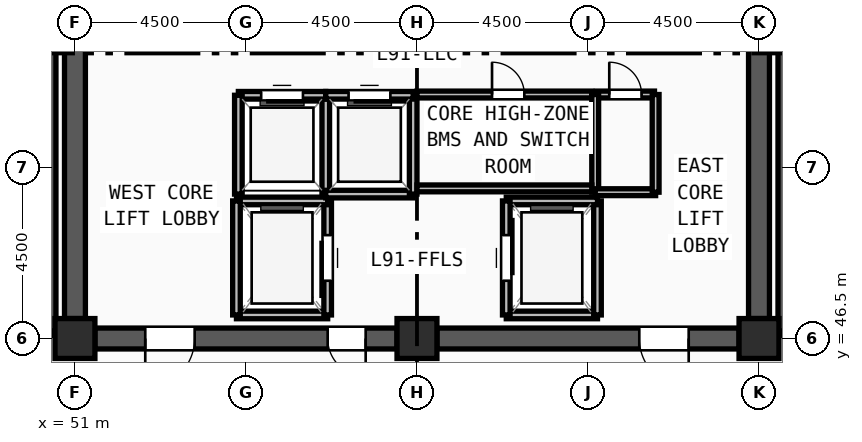
"""IFC4 building model, lengths in metres.
Left out: names, types, materials, properties, quantities, classifications, styles, units other than length and angle.
Written with IfcOpenShell. Run it as: python <this file> out.ifc"""

import sys

from ifc_helpers import new_model, si_unit, direction, frame, frame_2d, origin, origin_2d, place, context, subcontext, project, spatial, rectangle, extrude, source, transform, mapped, element, fill, save


model = new_model("IFC4")
c1 = context("Model", 3, precision=1e-05, world=origin(), true_north=direction((0.0, 1.0)))
c2 = subcontext(c1, "Body", "Model", "MODEL_VIEW")
j1 = project(units=[si_unit("LENGTHUNIT", "METRE"), si_unit("PLANEANGLEUNIT", "RADIAN")], contexts=[c1])
p1 = place(None, origin())
s1 = spatial("IfcSite", under=j1, at=p1, CompositionType="ELEMENT")
p2 = place(p1, origin())
s2 = spatial("IfcBuilding", under=s1, at=p2, CompositionType="ELEMENT")
p3 = place(p2, frame((0.0, 0.0, 351.0)))
s3 = spatial("IfcBuildingStorey", under=s2, at=p3, CompositionType="ELEMENT", Elevation=351.0)
m1 = source(origin(), c2, "Body", "SweptSolid", [
    extrude(rectangle(XDim=1.05, YDim=1.05, at=origin_2d()), origin(), (0.0, 0.0, 1.0), 4.8),
])
for number, where, z_axis, x_axis in (
    (1, (51.0, 46.5, 0.0), (0.0, 0.0, 1.0), (1.0, 0.0, 0.0)),
    (2, (60.0, 46.5, 0.0), (0.0, 0.0, 1.0), (1.0, 0.0, 0.0)),
    (3, (69.0, 46.5, 0.0), (0.0, 0.0, 1.0), (1.0, 0.0, 0.0)),
):
    element("IfcColumn", number, at=place(p3, frame(where, z_axis=z_axis, x_axis=x_axis)), inside=s3, PredefinedType="COLUMN", context=c2, shape_type="MappedRepresentation", body=[
        mapped(m1, transform((0.0, 0.0, 0.0), x_axis=(1.0, 0.0, 0.0), y_axis=(0.0, 1.0, 0.0), z_axis=(0.0, 0.0, 1.0), scale=1.0)),
    ])
p4 = place(p3, frame((69.0, 60.975, 0.0), z_axis=(0.0, 0.0, 1.0), x_axis=(0.0, -1.0, 0.0)))
e4 = element("IfcWall", 4, at=p4, inside=s3, PredefinedType="SHEAR", context=c2, shape_type="SweptSolid", body=[
    extrude(rectangle(XDim=13.95, YDim=0.55, at=frame_2d((6.975, 0.0))), origin(), (0.0, 0.0, 1.0), 4.52),
])
m2 = source(origin(), c2, "Body", "SweptSolid", [
    extrude(rectangle(XDim=1.2, YDim=2.2, at=frame_2d((0.6, 1.1))), frame((0.0, 0.285, 0.0), z_axis=(0.0, -1.0, 0.0), x_axis=(1.0, 0.0, 0.0)), (0.0, 0.0, 1.0), 0.57),
])
p5 = place(p4, frame((1.425, 0.0, 0.0)))
e5 = element("IfcOpeningElement", 5, at=p5, cuts=e4, PredefinedType="OPENING", context=c2, shape_type="MappedRepresentation", body=[
    mapped(m2, transform((0.0, 0.0, 0.0), x_axis=(1.0, 0.0, 0.0), y_axis=(0.0, 1.0, 0.0), z_axis=(0.0, 0.0, 1.0), scale=1.0)),
])
p6 = place(p3, frame((68.475, 46.5, 0.0), z_axis=(0.0, 0.0, 1.0), x_axis=(-1.0, 0.0, 0.0)))
e6 = element("IfcWall", 6, at=p6, inside=s3, PredefinedType="SHEAR", context=c2, shape_type="SweptSolid", body=[
    extrude(rectangle(XDim=7.95, YDim=0.55, at=frame_2d((3.975, 0.0))), origin(), (0.0, 0.0, 1.0), 4.52),
])
m3 = source(origin(), c2, "Body", "SweptSolid", [
    extrude(rectangle(XDim=1.3, YDim=2.2, at=frame_2d((0.65, 1.1))), frame((0.0, 0.285, 0.0), z_axis=(0.0, -1.0, 0.0), x_axis=(1.0, 0.0, 0.0)), (0.0, 0.0, 1.0), 0.57),
])
p7 = place(p6, frame((1.325, 0.0, 0.0)))
e7 = element("IfcOpeningElement", 7, at=p7, cuts=e6, PredefinedType="OPENING", context=c2, shape_type="MappedRepresentation", body=[
    mapped(m3, transform((0.0, 0.0, 0.0), x_axis=(1.0, 0.0, 0.0), y_axis=(0.0, 1.0, 0.0), z_axis=(0.0, 0.0, 1.0), scale=1.0)),
])
p8 = place(p3, frame((59.475, 46.5, 0.0), z_axis=(0.0, 0.0, 1.0), x_axis=(-1.0, 0.0, 0.0)))
e8 = element("IfcWall", 8, at=p8, inside=s3, PredefinedType="SHEAR", context=c2, shape_type="SweptSolid", body=[
    extrude(rectangle(XDim=7.95, YDim=0.55, at=frame_2d((3.975, 0.0))), origin(), (0.0, 0.0, 1.0), 4.52),
])
p9 = place(p8, frame((5.325, 0.0, 0.0)))
e9 = element("IfcOpeningElement", 9, at=p9, cuts=e8, PredefinedType="OPENING", context=c2, shape_type="MappedRepresentation", body=[
    mapped(m3, transform((0.0, 0.0, 0.0), x_axis=(1.0, 0.0, 0.0), y_axis=(0.0, 1.0, 0.0), z_axis=(0.0, 0.0, 1.0), scale=1.0)),
])
m4 = source(origin(), c2, "Body", "SweptSolid", [
    extrude(rectangle(XDim=1.0, YDim=2.2, at=frame_2d((0.5, 1.1))), frame((0.0, 0.285, 0.0), z_axis=(0.0, -1.0, 0.0), x_axis=(1.0, 0.0, 0.0)), (0.0, 0.0, 1.0), 0.57),
])
p10 = place(p8, frame((0.825, 0.0, 0.0)))
e10 = element("IfcOpeningElement", 10, at=p10, cuts=e8, PredefinedType="OPENING", context=c2, shape_type="MappedRepresentation", body=[
    mapped(m4, transform((0.0, 0.0, 0.0), x_axis=(1.0, 0.0, 0.0), y_axis=(0.0, 1.0, 0.0), z_axis=(0.0, 0.0, 1.0), scale=1.0)),
])
p11 = place(p3, frame((51.0, 47.025, 0.0), z_axis=(0.0, 0.0, 1.0), x_axis=(0.0, 1.0, 0.0)))
e11 = element("IfcWall", 11, at=p11, inside=s3, PredefinedType="SHEAR", context=c2, shape_type="SweptSolid", body=[
    extrude(rectangle(XDim=13.95, YDim=0.55, at=frame_2d((6.975, 0.0))), origin(), (0.0, 0.0, 1.0), 4.52),
])
for number, where, z_axis, x_axis in (
    (12, (50.38, 46.7, 0.0), (0.0, 0.0, 1.0), (0.0, 1.0, 0.0)),
    (13, (69.62, 54.52, 0.0), (0.0, 0.0, 1.0), (0.0, -1.0, 0.0)),
):
    element("IfcWall", number, at=place(p3, frame(where, z_axis=z_axis, x_axis=x_axis)), inside=s3, PredefinedType="SOLIDWALL", context=c2, shape_type="SweptSolid", body=[
        extrude(rectangle(XDim=7.82, YDim=0.24, at=frame_2d((3.91, 0.0))), origin(), (0.0, 0.0, 1.0), 4.52),
    ])
p12 = place(p3, frame((55.25, 47.12, 0.0), z_axis=(0.0, 0.0, 1.0), x_axis=(1.0, 0.0, 0.0)))
e14 = element("IfcWall", 14, at=p12, inside=s3, PredefinedType="SOLIDWALL", context=c2, shape_type="SweptSolid", body=[
    extrude(rectangle(XDim=2.4, YDim=0.2, at=frame_2d((1.2, 0.0))), origin(), (0.0, 0.0, 1.0), 4.52),
])
p13 = place(p3, frame((57.65, 47.12, 0.0), z_axis=(0.0, 0.0, 1.0), x_axis=(0.0, 1.0, 0.0)))
e15 = element("IfcWall", 15, at=p13, inside=s3, PredefinedType="SOLIDWALL", context=c2, shape_type="SweptSolid", body=[
    extrude(rectangle(XDim=3.0, YDim=0.2, at=frame_2d((1.5, 0.0))), origin(), (0.0, 0.0, 1.0), 4.52),
])
m5 = source(origin(), c2, "Body", "SweptSolid", [
    extrude(rectangle(XDim=1.2, YDim=2.3, at=frame_2d((0.6, 1.15))), frame((0.0, 0.11, 0.0), z_axis=(0.0, -1.0, 0.0), x_axis=(1.0, 0.0, 0.0)), (0.0, 0.0, 1.0), 0.22),
])
p14 = place(p13, frame((0.9, 0.0, 0.0)))
e16 = element("IfcOpeningElement", 16, at=p14, cuts=e15, PredefinedType="OPENING", context=c2, shape_type="MappedRepresentation", body=[
    mapped(m5, transform((0.0, 0.0, 0.0), x_axis=(1.0, 0.0, 0.0), y_axis=(0.0, 1.0, 0.0), z_axis=(0.0, 0.0, 1.0), scale=1.0)),
])
p15 = place(p3, frame((57.65, 50.12, 0.0), z_axis=(0.0, 0.0, 1.0), x_axis=(-1.0, 0.0, 0.0)))
e17 = element("IfcWall", 17, at=p15, inside=s3, PredefinedType="SOLIDWALL", context=c2, shape_type="SweptSolid", body=[
    extrude(rectangle(XDim=2.4, YDim=0.2, at=frame_2d((1.2, 0.0))), origin(), (0.0, 0.0, 1.0), 4.52),
])
p16 = place(p3, frame((55.25, 50.12, 0.0), z_axis=(0.0, 0.0, 1.0), x_axis=(0.0, -1.0, 0.0)))
e18 = element("IfcWall", 18, at=p16, inside=s3, PredefinedType="SOLIDWALL", context=c2, shape_type="SweptSolid", body=[
    extrude(rectangle(XDim=3.0, YDim=0.2, at=frame_2d((1.5, 0.0))), origin(), (0.0, 0.0, 1.0), 4.52),
])
p17 = place(p3, frame((62.35, 47.12, 0.0), z_axis=(0.0, 0.0, 1.0), x_axis=(1.0, 0.0, 0.0)))
e19 = element("IfcWall", 19, at=p17, inside=s3, PredefinedType="SOLIDWALL", context=c2, shape_type="SweptSolid", body=[
    extrude(rectangle(XDim=2.4, YDim=0.2, at=frame_2d((1.2, 0.0))), origin(), (0.0, 0.0, 1.0), 4.52),
])
p18 = place(p3, frame((64.75, 47.12, 0.0), z_axis=(0.0, 0.0, 1.0), x_axis=(0.0, 1.0, 0.0)))
e20 = element("IfcWall", 20, at=p18, inside=s3, PredefinedType="SOLIDWALL", context=c2, shape_type="SweptSolid", body=[
    extrude(rectangle(XDim=3.0, YDim=0.2, at=frame_2d((1.5, 0.0))), origin(), (0.0, 0.0, 1.0), 4.52),
])
p19 = place(p3, frame((64.75, 50.12, 0.0), z_axis=(0.0, 0.0, 1.0), x_axis=(-1.0, 0.0, 0.0)))
e21 = element("IfcWall", 21, at=p19, inside=s3, PredefinedType="SOLIDWALL", context=c2, shape_type="SweptSolid", body=[
    extrude(rectangle(XDim=2.4, YDim=0.2, at=frame_2d((1.2, 0.0))), origin(), (0.0, 0.0, 1.0), 4.52),
])
p20 = place(p3, frame((62.35, 50.12, 0.0), z_axis=(0.0, 0.0, 1.0), x_axis=(0.0, -1.0, 0.0)))
e22 = element("IfcWall", 22, at=p20, inside=s3, PredefinedType="SOLIDWALL", context=c2, shape_type="SweptSolid", body=[
    extrude(rectangle(XDim=3.0, YDim=0.2, at=frame_2d((1.5, 0.0))), origin(), (0.0, 0.0, 1.0), 4.52),
])
p21 = place(p20, frame((0.9, 0.0, 0.0)))
e23 = element("IfcOpeningElement", 23, at=p21, cuts=e22, PredefinedType="OPENING", context=c2, shape_type="MappedRepresentation", body=[
    mapped(m5, transform((0.0, 0.0, 0.0), x_axis=(1.0, 0.0, 0.0), y_axis=(0.0, 1.0, 0.0), z_axis=(0.0, 0.0, 1.0), scale=1.0)),
])
p22 = place(p3, frame((57.6, 50.3, 0.0), z_axis=(0.0, 0.0, 1.0), x_axis=(0.0, 1.0, 0.0)))
e24 = element("IfcWall", 24, at=p22, inside=s3, PredefinedType="SOLIDWALL", context=c2, shape_type="SweptSolid", body=[
    extrude(rectangle(XDim=2.6, YDim=0.2, at=frame_2d((1.3, 0.0))), origin(), (0.0, 0.0, 1.0), 4.52),
])
p23 = place(p3, frame((57.6, 52.9, 0.0), z_axis=(0.0, 0.0, 1.0), x_axis=(-1.0, 0.0, 0.0)))
e25 = element("IfcWall", 25, at=p23, inside=s3, PredefinedType="SOLIDWALL", context=c2, shape_type="SweptSolid", body=[
    extrude(rectangle(XDim=2.3, YDim=0.2, at=frame_2d((1.15, 0.0))), origin(), (0.0, 0.0, 1.0), 4.52),
])
m6 = source(origin(), c2, "Body", "SweptSolid", [
    extrude(rectangle(XDim=1.1, YDim=2.2, at=frame_2d((0.55, 1.1))), frame((0.0, 0.11, 0.0), z_axis=(0.0, -1.0, 0.0), x_axis=(1.0, 0.0, 0.0)), (0.0, 0.0, 1.0), 0.22),
])
p24 = place(p23, frame((0.6, 0.0, 0.0)))
e26 = element("IfcOpeningElement", 26, at=p24, cuts=e25, PredefinedType="OPENING", context=c2, shape_type="MappedRepresentation", body=[
    mapped(m6, transform((0.0, 0.0, 0.0), x_axis=(1.0, 0.0, 0.0), y_axis=(0.0, 1.0, 0.0), z_axis=(0.0, 0.0, 1.0), scale=1.0)),
])
p25 = place(p3, frame((55.3, 52.9, 0.0), z_axis=(0.0, 0.0, 1.0), x_axis=(0.0, -1.0, 0.0)))
e27 = element("IfcWall", 27, at=p25, inside=s3, PredefinedType="SOLIDWALL", context=c2, shape_type="SweptSolid", body=[
    extrude(rectangle(XDim=2.6, YDim=0.2, at=frame_2d((1.3, 0.0))), origin(), (0.0, 0.0, 1.0), 4.52),
])
p26 = place(p3, frame((57.6, 50.3, 0.0), z_axis=(0.0, 0.0, 1.0), x_axis=(1.0, 0.0, 0.0)))
e28 = element("IfcWall", 28, at=p26, inside=s3, PredefinedType="SOLIDWALL", context=c2, shape_type="SweptSolid", body=[
    extrude(rectangle(XDim=2.3, YDim=0.2, at=frame_2d((1.15, 0.0))), origin(), (0.0, 0.0, 1.0), 4.52),
])
p27 = place(p3, frame((59.9, 50.3, 0.0), z_axis=(0.0, 0.0, 1.0), x_axis=(0.0, 1.0, 0.0)))
e29 = element("IfcWall", 29, at=p27, inside=s3, PredefinedType="SOLIDWALL", context=c2, shape_type="SweptSolid", body=[
    extrude(rectangle(XDim=2.6, YDim=0.2, at=frame_2d((1.3, 0.0))), origin(), (0.0, 0.0, 1.0), 4.52),
])
p28 = place(p3, frame((59.9, 52.9, 0.0), z_axis=(0.0, 0.0, 1.0), x_axis=(-1.0, 0.0, 0.0)))
e30 = element("IfcWall", 30, at=p28, inside=s3, PredefinedType="SOLIDWALL", context=c2, shape_type="SweptSolid", body=[
    extrude(rectangle(XDim=2.3, YDim=0.2, at=frame_2d((1.15, 0.0))), origin(), (0.0, 0.0, 1.0), 4.52),
])
p29 = place(p28, frame((0.6, 0.0, 0.0)))
e31 = element("IfcOpeningElement", 31, at=p29, cuts=e30, PredefinedType="OPENING", context=c2, shape_type="MappedRepresentation", body=[
    mapped(m6, transform((0.0, 0.0, 0.0), x_axis=(1.0, 0.0, 0.0), y_axis=(0.0, 1.0, 0.0), z_axis=(0.0, 0.0, 1.0), scale=1.0)),
])
p30 = place(p3, frame((60.0, 52.92, 0.0), z_axis=(0.0, 0.0, 1.0), x_axis=(1.0, 0.0, 0.0)))
e32 = element("IfcWall", 32, at=p30, inside=s3, PredefinedType="PARTITIONING", context=c2, shape_type="SweptSolid", body=[
    extrude(rectangle(XDim=4.6, YDim=0.18, at=frame_2d((2.3, 0.0))), origin(), (0.0, 0.0, 1.0), 4.52),
])
m7 = source(origin(), c2, "Body", "SweptSolid", [
    extrude(rectangle(XDim=0.85, YDim=2.1, at=frame_2d((0.425, 1.05))), frame((0.0, 0.1, 0.0), z_axis=(0.0, -1.0, 0.0), x_axis=(1.0, 0.0, 0.0)), (0.0, 0.0, 1.0), 0.2),
])
p31 = place(p30, frame((1.975, 0.0, 0.0)))
e33 = element("IfcOpeningElement", 33, at=p31, cuts=e32, PredefinedType="OPENING", context=c2, shape_type="MappedRepresentation", body=[
    mapped(m7, transform((0.0, 0.0, 0.0), x_axis=(1.0, 0.0, 0.0), y_axis=(0.0, 1.0, 0.0), z_axis=(0.0, 0.0, 1.0), scale=1.0)),
])
p32 = place(p3, frame((64.72, 52.92, 0.0), z_axis=(0.0, 0.0, 1.0), x_axis=(1.0, 0.0, 0.0)))
e34 = element("IfcWall", 34, at=p32, inside=s3, PredefinedType="PARTITIONING", context=c2, shape_type="SweptSolid", body=[
    extrude(rectangle(XDim=1.53, YDim=0.18, at=frame_2d((0.765, 0.0))), origin(), (0.0, 0.0, 1.0), 4.52),
])
p33 = place(p32, frame((0.34, 0.0, 0.0)))
e35 = element("IfcOpeningElement", 35, at=p33, cuts=e34, PredefinedType="OPENING", context=c2, shape_type="MappedRepresentation", body=[
    mapped(m7, transform((0.0, 0.0, 0.0), x_axis=(1.0, 0.0, 0.0), y_axis=(0.0, 1.0, 0.0), z_axis=(0.0, 0.0, 1.0), scale=1.0)),
])
p34 = place(p3, frame((64.69, 50.35, 0.0), z_axis=(0.0, 0.0, 1.0), x_axis=(0.0, 1.0, 0.0)))
e36 = element("IfcWall", 36, at=p34, inside=s3, PredefinedType="PARTITIONING", context=c2, shape_type="SweptSolid", body=[
    extrude(rectangle(XDim=2.57, YDim=0.18, at=frame_2d((1.285, 0.0))), origin(), (0.0, 0.0, 1.0), 4.52),
])
p35 = place(p3, frame((64.69, 50.35, 0.0), z_axis=(0.0, 0.0, 1.0), x_axis=(1.0, 0.0, 0.0)))
e37 = element("IfcWall", 37, at=p35, inside=s3, PredefinedType="PARTITIONING", context=c2, shape_type="SweptSolid", body=[
    extrude(rectangle(XDim=1.59, YDim=0.18, at=frame_2d((0.795, 0.0))), origin(), (0.0, 0.0, 1.0), 4.52),
])
p36 = place(p3, frame((66.28, 50.35, 0.0), z_axis=(0.0, 0.0, 1.0), x_axis=(0.0, 1.0, 0.0)))
e38 = element("IfcWall", 38, at=p36, inside=s3, PredefinedType="PARTITIONING", context=c2, shape_type="SweptSolid", body=[
    extrude(rectangle(XDim=2.57, YDim=0.18, at=frame_2d((1.285, 0.0))), origin(), (0.0, 0.0, 1.0), 4.52),
])
p37 = place(p3, frame((60.0, 50.45, 0.0), z_axis=(0.0, 0.0, 1.0), x_axis=(1.0, 0.0, 0.0)))
e39 = element("IfcWall", 39, at=p37, inside=s3, PredefinedType="PARTITIONING", context=c2, shape_type="SweptSolid", body=[
    extrude(rectangle(XDim=4.6, YDim=0.18, at=frame_2d((2.3, 0.0))), origin(), (0.0, 0.0, 1.0), 4.52),
])
m8 = source(origin(), c2, "Body", "SweptSolid", [
    extrude(rectangle(XDim=1.3, YDim=2.2, at=frame_2d((0.65, 1.1))), frame((0.0, 0.025, 0.0), z_axis=(0.0, -1.0, 0.0), x_axis=(1.0, 0.0, 0.0)), (0.0, 0.0, 1.0), 0.05),
])
p38 = place(p9, origin())
e40 = element("IfcDoor", 40, at=p38, inside=s3, OperationType="SINGLE_SWING_RIGHT", PredefinedType="DOOR", context=c2, shape_type="MappedRepresentation", body=[
    mapped(m8, transform((0.0, 0.0, 0.0), x_axis=(1.0, 0.0, 0.0), y_axis=(0.0, 1.0, 0.0), z_axis=(0.0, 0.0, 1.0), scale=1.0)),
])
fill(e9, e40)
m9 = source(origin(), c2, "Body", "SweptSolid", [
    extrude(rectangle(XDim=1.0, YDim=2.2, at=frame_2d((0.5, 1.1))), frame((0.0, 0.025, 0.0), z_axis=(0.0, -1.0, 0.0), x_axis=(1.0, 0.0, 0.0)), (0.0, 0.0, 1.0), 0.05),
])
p39 = place(p10, origin())
e41 = element("IfcDoor", 41, at=p39, inside=s3, OperationType="SINGLE_SWING_LEFT", PredefinedType="DOOR", context=c2, shape_type="MappedRepresentation", body=[
    mapped(m9, transform((0.0, 0.0, 0.0), x_axis=(1.0, 0.0, 0.0), y_axis=(0.0, 1.0, 0.0), z_axis=(0.0, 0.0, 1.0), scale=1.0)),
])
fill(e10, e41)
p40 = place(p7, origin())
e42 = element("IfcDoor", 42, at=p40, inside=s3, OperationType="SINGLE_SWING_LEFT", PredefinedType="DOOR", context=c2, shape_type="MappedRepresentation", body=[
    mapped(m8, transform((0.0, 0.0, 0.0), x_axis=(1.0, 0.0, 0.0), y_axis=(0.0, 1.0, 0.0), z_axis=(0.0, 0.0, 1.0), scale=1.0)),
])
fill(e7, e42)
m10 = source(origin(), c2, "Body", "SweptSolid", [
    extrude(rectangle(XDim=1.2, YDim=2.3, at=frame_2d((0.6, 1.15))), frame((0.0, 0.025, 0.0), z_axis=(0.0, -1.0, 0.0), x_axis=(1.0, 0.0, 0.0)), (0.0, 0.0, 1.0), 0.05),
])
p41 = place(p14, origin())
e43 = element("IfcDoor", 43, at=p41, inside=s3, OperationType="SLIDING_TO_LEFT", PredefinedType="DOOR", context=c2, shape_type="MappedRepresentation", body=[
    mapped(m10, transform((0.0, 0.0, 0.0), x_axis=(1.0, 0.0, 0.0), y_axis=(0.0, 1.0, 0.0), z_axis=(0.0, 0.0, 1.0), scale=1.0)),
])
fill(e16, e43)
p42 = place(p21, origin())
e44 = element("IfcDoor", 44, at=p42, inside=s3, OperationType="SLIDING_TO_LEFT", PredefinedType="DOOR", context=c2, shape_type="MappedRepresentation", body=[
    mapped(m10, transform((0.0, 0.0, 0.0), x_axis=(1.0, 0.0, 0.0), y_axis=(0.0, 1.0, 0.0), z_axis=(0.0, 0.0, 1.0), scale=1.0)),
])
fill(e23, e44)
m11 = source(origin(), c2, "Body", "SweptSolid", [
    extrude(rectangle(XDim=1.1, YDim=2.2, at=frame_2d((0.55, 1.1))), frame((0.0, 0.025, 0.0), z_axis=(0.0, -1.0, 0.0), x_axis=(1.0, 0.0, 0.0)), (0.0, 0.0, 1.0), 0.05),
])
p43 = place(p24, origin())
e45 = element("IfcDoor", 45, at=p43, inside=s3, OperationType="SLIDING_TO_LEFT", PredefinedType="DOOR", context=c2, shape_type="MappedRepresentation", body=[
    mapped(m11, transform((0.0, 0.0, 0.0), x_axis=(1.0, 0.0, 0.0), y_axis=(0.0, 1.0, 0.0), z_axis=(0.0, 0.0, 1.0), scale=1.0)),
])
fill(e26, e45)
p44 = place(p29, origin())
e46 = element("IfcDoor", 46, at=p44, inside=s3, OperationType="SLIDING_TO_LEFT", PredefinedType="DOOR", context=c2, shape_type="MappedRepresentation", body=[
    mapped(m11, transform((0.0, 0.0, 0.0), x_axis=(1.0, 0.0, 0.0), y_axis=(0.0, 1.0, 0.0), z_axis=(0.0, 0.0, 1.0), scale=1.0)),
])
fill(e31, e46)
m12 = source(origin(), c2, "Body", "SweptSolid", [
    extrude(rectangle(XDim=0.85, YDim=2.1, at=frame_2d((0.425, 1.05))), frame((0.0, 0.025, 0.0), z_axis=(0.0, -1.0, 0.0), x_axis=(1.0, 0.0, 0.0)), (0.0, 0.0, 1.0), 0.05),
])
p45 = place(p31, origin())
e47 = element("IfcDoor", 47, at=p45, inside=s3, OperationType="SINGLE_SWING_LEFT", PredefinedType="DOOR", context=c2, shape_type="MappedRepresentation", body=[
    mapped(m12, transform((0.0, 0.0, 0.0), x_axis=(1.0, 0.0, 0.0), y_axis=(0.0, 1.0, 0.0), z_axis=(0.0, 0.0, 1.0), scale=1.0)),
])
fill(e33, e47)
p46 = place(p33, origin())
e48 = element("IfcDoor", 48, at=p46, inside=s3, OperationType="SINGLE_SWING_LEFT", PredefinedType="DOOR", context=c2, shape_type="MappedRepresentation", body=[
    mapped(m12, transform((0.0, 0.0, 0.0), x_axis=(1.0, 0.0, 0.0), y_axis=(0.0, 1.0, 0.0), z_axis=(0.0, 0.0, 1.0), scale=1.0)),
])
fill(e35, e48)
save(model, sys.argv[1])
